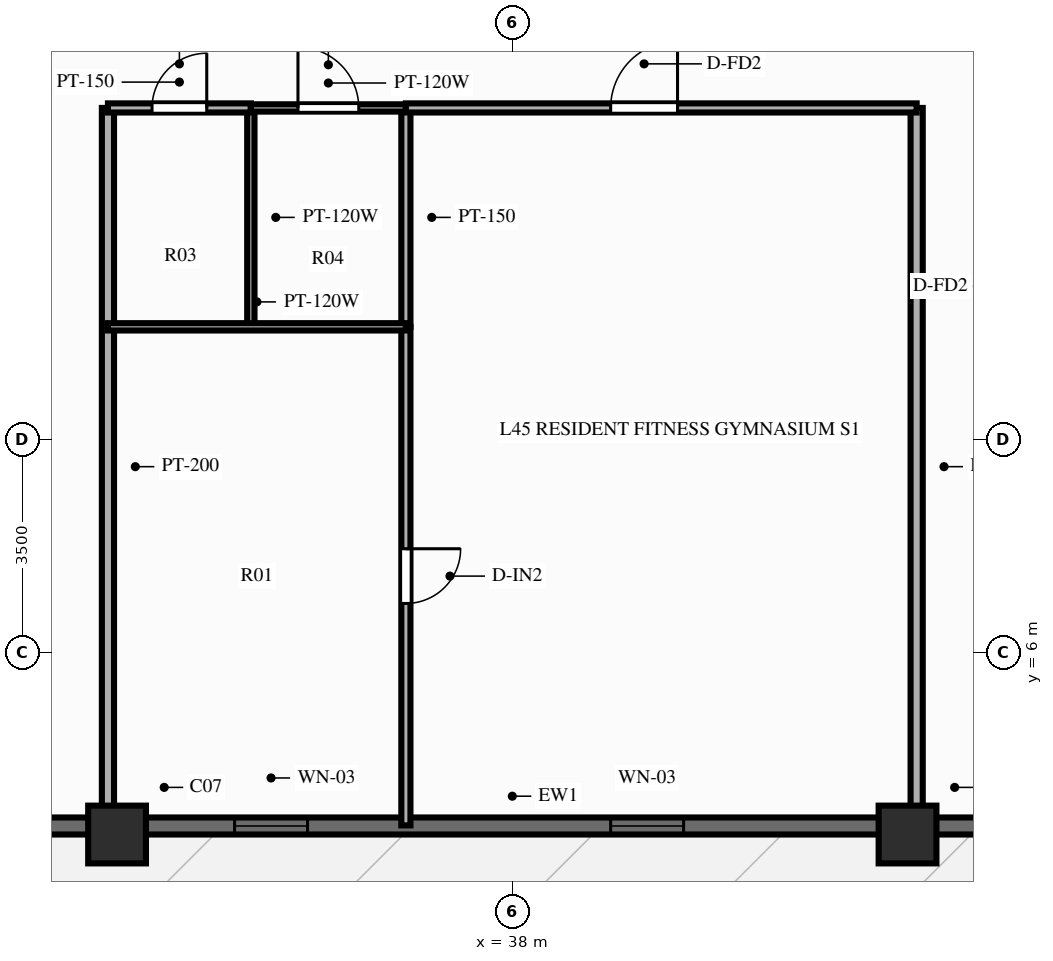
"""IFC4 building model, lengths in metres.
Left out: names, types, materials, properties, quantities, classifications, styles, units other than length and angle.
Written with IfcOpenShell. Run it as: python <this file> out.ifc"""

import sys

from ifc_helpers import new_model, si_unit, direction, frame, frame_2d, origin, origin_2d, place, context, subcontext, project, spatial, rectangle, extrude, source, transform, mapped, element, fill, save


model = new_model("IFC4")
c1 = context("Model", 3, precision=1e-05, world=origin(), true_north=direction((0.0, 1.0)))
c2 = subcontext(c1, "Body", "Model", "MODEL_VIEW")
j1 = project(units=[si_unit("LENGTHUNIT", "METRE"), si_unit("PLANEANGLEUNIT", "RADIAN")], contexts=[c1])
p1 = place(None, origin())
s1 = spatial("IfcSite", under=j1, at=p1, CompositionType="ELEMENT")
p2 = place(p1, origin())
s2 = spatial("IfcBuilding", under=s1, at=p2, CompositionType="ELEMENT")
p3 = place(p2, frame((0.0, 0.0, 141.75)))
s3 = spatial("IfcBuildingStorey", under=s2, at=p3, CompositionType="ELEMENT", Elevation=141.75)
m1 = source(origin(), c2, "Body", "SweptSolid", [
    extrude(rectangle(XDim=0.95, YDim=0.95, at=origin_2d()), origin(), (0.0, 0.0, 1.0), 3.0),
])
for number, where, z_axis, x_axis in (
    (1, (31.5, 3.0, 0.0), (0.0, 0.0, 1.0), (1.0, 0.0, 0.0)),
    (2, (44.5, 3.0, 0.0), (0.0, 0.0, 1.0), (1.0, 0.0, 0.0)),
):
    element("IfcColumn", number, at=place(p3, frame(where, z_axis=z_axis, x_axis=x_axis)), inside=s3, PredefinedType="COLUMN", context=c2, shape_type="MappedRepresentation", body=[
        mapped(m1, transform((0.0, 0.0, 0.0), scale=1.0)),
    ])
p4 = place(p3, frame((16.2, 3.14, 0.0), z_axis=(0.0, 0.0, 1.0), x_axis=(1.0, 0.0, 0.0)))
e3 = element("IfcWall", 3, at=p4, inside=s3, PredefinedType="SOLIDWALL", context=c2, shape_type="SweptSolid", body=[
    extrude(rectangle(XDim=43.6, YDim=0.28, at=frame_2d((21.8, 0.0))), origin(), (0.0, 0.0, 1.0), 2.28),
])
p5 = place(p4, frame((8.2, 0.0, 0.0), z_axis=(0.0, 0.0, 1.0), x_axis=(-1.0, 0.0, 0.0)))
e4 = element("IfcOpeningElement", 4, at=p5, cuts=e3, PredefinedType="OPENING", context=c2, shape_type="SweptSolid", body=[
    extrude(rectangle(XDim=1.1, YDim=2.15, at=frame_2d((0.55, 1.075))), frame((0.0, 0.152, 0.0), z_axis=(0.0, -1.0, 0.0), x_axis=(1.0, 0.0, 0.0)), (0.0, 0.0, 1.0), 0.304),
])
p6 = place(p4, frame((17.232, 0.0, 0.25)))
e5 = element("IfcOpeningElement", 5, at=p6, cuts=e3, PredefinedType="OPENING", context=c2, shape_type="SweptSolid", body=[
    extrude(rectangle(XDim=1.2, YDim=1.5, at=frame_2d((0.6, 0.75))), frame((0.0, 0.152, 0.0), z_axis=(0.0, -1.0, 0.0), x_axis=(1.0, 0.0, 0.0)), (0.0, 0.0, 1.0), 0.304),
])
p7 = place(p4, frame((23.417, 0.0, 0.25)))
e6 = element("IfcOpeningElement", 6, at=p7, cuts=e3, PredefinedType="OPENING", context=c2, shape_type="SweptSolid", body=[
    extrude(rectangle(XDim=1.2, YDim=1.5, at=frame_2d((0.6, 0.75))), frame((0.0, 0.152, 0.0), z_axis=(0.0, -1.0, 0.0), x_axis=(1.0, 0.0, 0.0)), (0.0, 0.0, 1.0), 0.304),
])
p8 = place(p4, frame((35.35, 0.0, 0.25)))
e7 = element("IfcOpeningElement", 7, at=p8, cuts=e3, PredefinedType="OPENING", context=c2, shape_type="SweptSolid", body=[
    extrude(rectangle(XDim=1.2, YDim=1.5, at=frame_2d((0.6, 0.75))), frame((0.0, 0.152, 0.0), z_axis=(0.0, -1.0, 0.0), x_axis=(1.0, 0.0, 0.0)), (0.0, 0.0, 1.0), 0.304),
])
for number, where, z_axis, x_axis in (
    (8, (31.35, 14.95, 0.0), (0.0, 0.0, 1.0), (0.0, -1.0, 0.0)),
    (9, (44.65, 14.95, 0.0), (0.0, 0.0, 1.0), (0.0, -1.0, 0.0)),
):
    element("IfcWall", number, at=place(p3, frame(where, z_axis=z_axis, x_axis=x_axis)), inside=s3, PredefinedType="PARTITIONING", context=c2, shape_type="SweptSolid", body=[
        extrude(rectangle(XDim=11.8, YDim=0.2, at=frame_2d((5.9, 0.0))), origin(), (0.0, 0.0, 1.0), 2.34),
    ])
p9 = place(p3, frame((33.7, 14.95, 0.0), z_axis=(0.0, 0.0, 1.0), x_axis=(0.0, -1.0, 0.0)))
e10 = element("IfcWall", 10, at=p9, inside=s3, PredefinedType="PARTITIONING", context=c2, shape_type="SweptSolid", body=[
    extrude(rectangle(XDim=3.6, YDim=0.12, at=frame_2d((1.8, 0.0))), origin(), (0.0, 0.0, 1.0), 2.7),
])
p10 = place(p3, frame((36.25, 14.95, 0.0), z_axis=(0.0, 0.0, 1.0), x_axis=(0.0, -1.0, 0.0)))
e11 = element("IfcWall", 11, at=p10, inside=s3, PredefinedType="PARTITIONING", context=c2, shape_type="SweptSolid", body=[
    extrude(rectangle(XDim=3.6, YDim=0.15, at=frame_2d((1.8, 0.0))), origin(), (0.0, 0.0, 1.0), 2.7),
])
p11 = place(p3, frame((36.25, 11.35, 0.0), z_axis=(0.0, 0.0, 1.0), x_axis=(0.0, -1.0, 0.0)))
e12 = element("IfcWall", 12, at=p11, inside=s3, PredefinedType="PARTITIONING", context=c2, shape_type="SweptSolid", body=[
    extrude(rectangle(XDim=8.2, YDim=0.15, at=frame_2d((4.1, 0.0))), origin(), (0.0, 0.0, 1.0), 2.7),
])
p12 = place(p11, frame((3.65, 0.0, 0.0)))
e13 = element("IfcOpeningElement", 13, at=p12, cuts=e12, PredefinedType="OPENING", context=c2, shape_type="SweptSolid", body=[
    extrude(rectangle(XDim=0.9, YDim=2.1, at=frame_2d((0.45, 1.05))), frame((0.0, 0.087, 0.0), z_axis=(0.0, -1.0, 0.0), x_axis=(1.0, 0.0, 0.0)), (0.0, 0.0, 1.0), 0.174),
])
p13 = place(p3, frame((31.35, 11.35, 0.0), z_axis=(0.0, 0.0, 1.0), x_axis=(1.0, 0.0, 0.0)))
e14 = element("IfcWall", 14, at=p13, inside=s3, PredefinedType="PARTITIONING", context=c2, shape_type="SweptSolid", body=[
    extrude(rectangle(XDim=4.9, YDim=0.12, at=frame_2d((2.45, 0.0))), origin(), (0.0, 0.0, 1.0), 2.7),
])
p14 = place(p3, frame((31.35, 14.95, 0.0), z_axis=(0.0, 0.0, 1.0), x_axis=(1.0, 0.0, 0.0)))
e15 = element("IfcWall", 15, at=p14, inside=s3, PredefinedType="PARTITIONING", context=c2, shape_type="SweptSolid", body=[
    extrude(rectangle(XDim=2.35, YDim=0.15, at=frame_2d((1.175, 0.0))), origin(), (0.0, 0.0, 1.0), 2.7),
])
p15 = place(p14, frame((0.725, 0.0, 0.0)))
e16 = element("IfcOpeningElement", 16, at=p15, cuts=e15, PredefinedType="OPENING", context=c2, shape_type="SweptSolid", body=[
    extrude(rectangle(XDim=0.9, YDim=2.1, at=frame_2d((0.45, 1.05))), frame((0.0, 0.087, 0.0), z_axis=(0.0, -1.0, 0.0), x_axis=(1.0, 0.0, 0.0)), (0.0, 0.0, 1.0), 0.174),
])
p16 = place(p3, frame((33.7, 14.95, 0.0), z_axis=(0.0, 0.0, 1.0), x_axis=(1.0, 0.0, 0.0)))
e17 = element("IfcWall", 17, at=p16, inside=s3, PredefinedType="PARTITIONING", context=c2, shape_type="SweptSolid", body=[
    extrude(rectangle(XDim=2.55, YDim=0.12, at=frame_2d((1.275, 0.0))), origin(), (0.0, 0.0, 1.0), 2.7),
])
p17 = place(p16, frame((0.775, 0.0, 0.0)))
e18 = element("IfcOpeningElement", 18, at=p17, cuts=e17, PredefinedType="OPENING", context=c2, shape_type="SweptSolid", body=[
    extrude(rectangle(XDim=1.0, YDim=2.1, at=frame_2d((0.5, 1.05))), frame((0.0, 0.072, 0.0), z_axis=(0.0, -1.0, 0.0), x_axis=(1.0, 0.0, 0.0)), (0.0, 0.0, 1.0), 0.144),
])
p18 = place(p3, frame((36.25, 14.95, 0.0), z_axis=(0.0, 0.0, 1.0), x_axis=(1.0, 0.0, 0.0)))
e19 = element("IfcWall", 19, at=p18, inside=s3, PredefinedType="PARTITIONING", context=c2, shape_type="SweptSolid", body=[
    extrude(rectangle(XDim=8.4, YDim=0.15, at=frame_2d((4.2, 0.0))), origin(), (0.0, 0.0, 1.0), 2.7),
])
p19 = place(p18, frame((3.367, 0.0, 0.0)))
e20 = element("IfcOpeningElement", 20, at=p19, cuts=e19, PredefinedType="OPENING", context=c2, shape_type="SweptSolid", body=[
    extrude(rectangle(XDim=1.1, YDim=2.15, at=frame_2d((0.55, 1.075))), frame((0.0, 0.087, 0.0), z_axis=(0.0, -1.0, 0.0), x_axis=(1.0, 0.0, 0.0)), (0.0, 0.0, 1.0), 0.174),
])
m2 = source(origin(), c2, "Body", "SweptSolid", [
    extrude(rectangle(XDim=1.2, YDim=1.5, at=frame_2d((0.6, 0.75))), frame((0.0, 0.03, 0.0), z_axis=(0.0, -1.0, 0.0), x_axis=(1.0, 0.0, 0.0)), (0.0, 0.0, 1.0), 0.06),
])
p20 = place(p6, origin())
e21 = element("IfcWindow", 21, at=p20, inside=s3, PartitioningType="SINGLE_PANEL", PredefinedType="WINDOW", context=c2, shape_type="MappedRepresentation", body=[
    mapped(m2, transform((0.0, 0.0, 0.0), scale=1.0)),
])
fill(e5, e21)
p21 = place(p7, origin())
e22 = element("IfcWindow", 22, at=p21, inside=s3, PartitioningType="SINGLE_PANEL", PredefinedType="WINDOW", context=c2, shape_type="MappedRepresentation", body=[
    mapped(m2, transform((0.0, 0.0, 0.0), scale=1.0)),
])
fill(e6, e22)
m3 = source(origin(), c2, "Body", "SweptSolid", [
    extrude(rectangle(XDim=0.9, YDim=2.1, at=frame_2d((0.45, 1.05))), frame((0.0, 0.025, 0.0), z_axis=(0.0, -1.0, 0.0), x_axis=(1.0, 0.0, 0.0)), (0.0, 0.0, 1.0), 0.05),
])
p22 = place(p12, origin())
e23 = element("IfcDoor", 23, at=p22, inside=s3, OperationType="SINGLE_SWING_LEFT", PredefinedType="DOOR", context=c2, shape_type="MappedRepresentation", body=[
    mapped(m3, transform((0.0, 0.0, 0.0), scale=1.0)),
])
fill(e13, e23)
p23 = place(p15, origin())
e24 = element("IfcDoor", 24, at=p23, inside=s3, OperationType="SINGLE_SWING_RIGHT", PredefinedType="DOOR", context=c2, shape_type="MappedRepresentation", body=[
    mapped(m3, transform((0.0, 0.0, 0.0), scale=1.0)),
])
fill(e16, e24)
m4 = source(origin(), c2, "Body", "SweptSolid", [
    extrude(rectangle(XDim=1.0, YDim=2.1, at=frame_2d((0.5, 1.05))), frame((0.0, 0.025, 0.0), z_axis=(0.0, -1.0, 0.0), x_axis=(1.0, 0.0, 0.0)), (0.0, 0.0, 1.0), 0.05),
])
p24 = place(p17, origin())
e25 = element("IfcDoor", 25, at=p24, inside=s3, OperationType="SINGLE_SWING_LEFT", PredefinedType="DOOR", context=c2, shape_type="MappedRepresentation", body=[
    mapped(m4, transform((0.0, 0.0, 0.0), scale=1.0)),
])
fill(e18, e25)
m5 = source(origin(), c2, "Body", "SweptSolid", [
    extrude(rectangle(XDim=1.1, YDim=2.15, at=frame_2d((0.55, 1.075))), frame((0.0, 0.025, 0.0), z_axis=(0.0, -1.0, 0.0), x_axis=(1.0, 0.0, 0.0)), (0.0, 0.0, 1.0), 0.05),
])
p25 = place(p19, origin())
e26 = element("IfcDoor", 26, at=p25, inside=s3, OperationType="SINGLE_SWING_RIGHT", PredefinedType="DOOR", context=c2, shape_type="MappedRepresentation", body=[
    mapped(m5, transform((0.0, 0.0, 0.0), scale=1.0)),
])
fill(e20, e26)
save(model, sys.argv[1])
